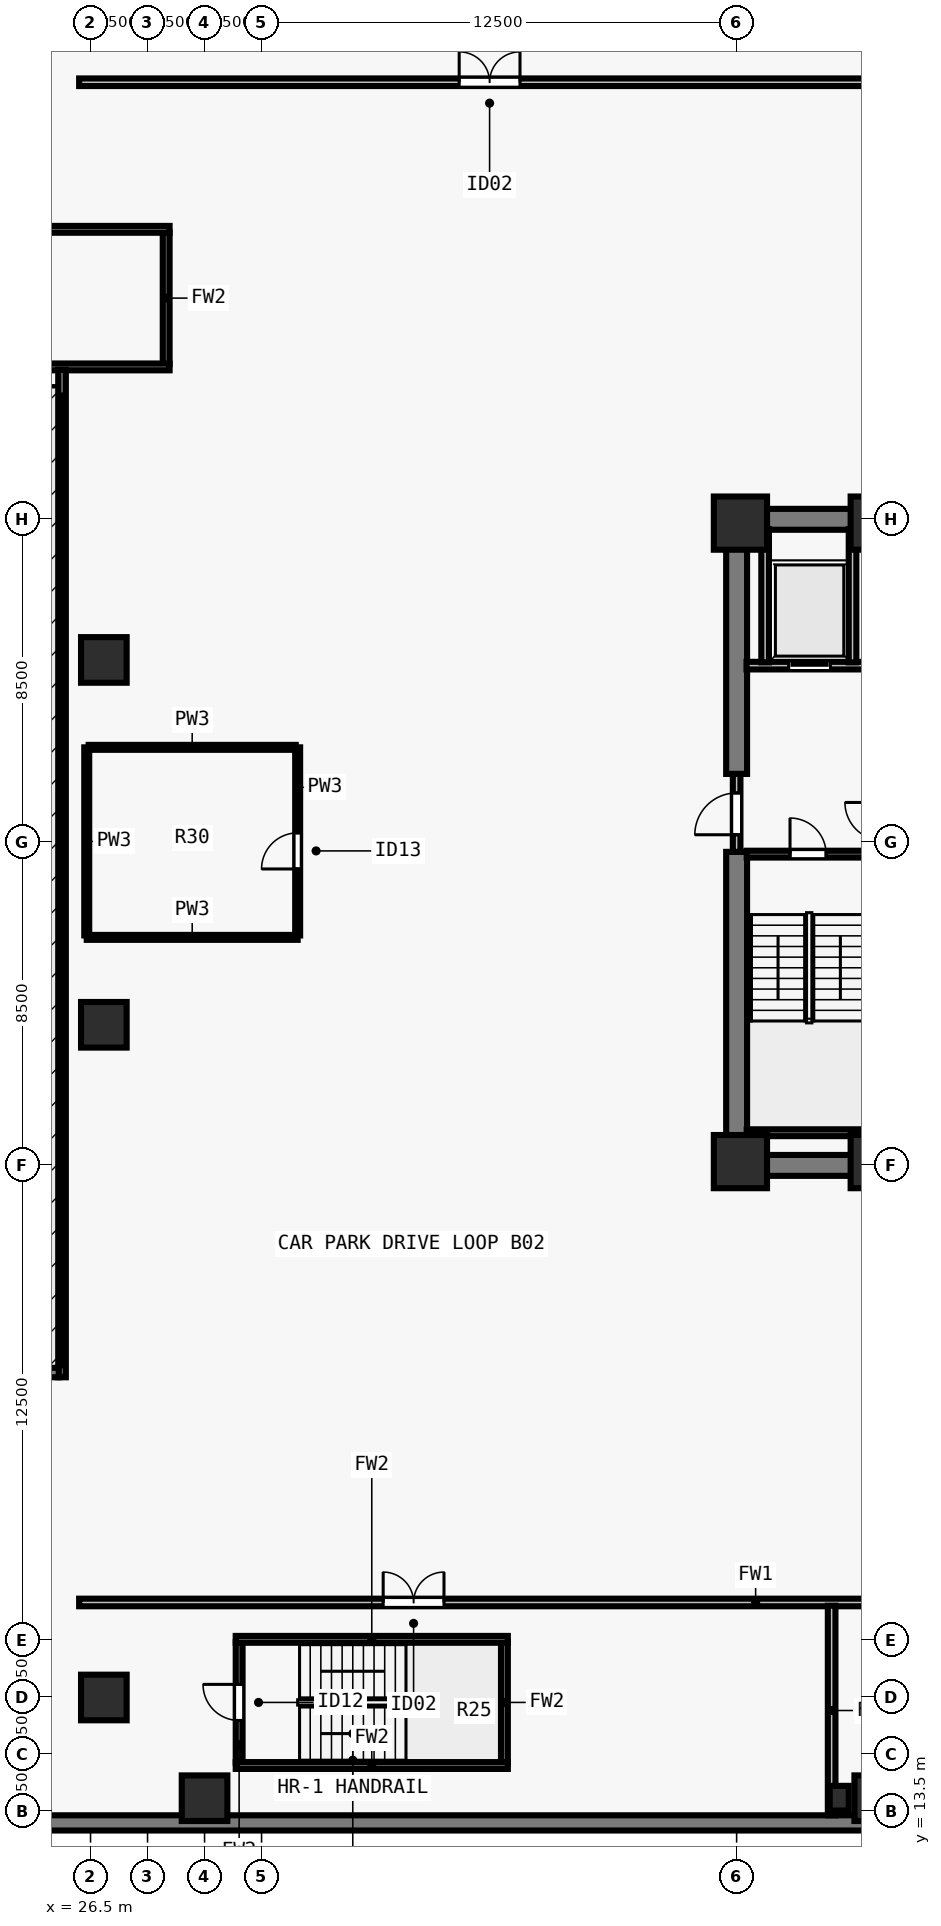
"""IFC4 building model, lengths in metres.
Left out: names, types, materials, properties, quantities, classifications, styles, units other than length and angle.
Written with IfcOpenShell. Run it as: python <this file> out.ifc"""

import sys

from ifc_helpers import new_model, si_unit, direction, frame, frame_2d, origin, origin_2d, place, context, subcontext, project, spatial, rectangle, extrude, element, fill, save


model = new_model("IFC4")
c1 = context("Model", 3, precision=1e-05, world=origin(), true_north=direction((0.0, 1.0)))
c2 = subcontext(c1, "Body", "Model", "MODEL_VIEW")
j1 = project(units=[si_unit("LENGTHUNIT", "METRE"), si_unit("PLANEANGLEUNIT", "RADIAN")], contexts=[c1])
p1 = place(None, origin())
s1 = spatial("IfcSite", under=j1, at=p1, CompositionType="ELEMENT")
p2 = place(p1, origin())
s2 = spatial("IfcBuilding", under=s1, at=p2, CompositionType="ELEMENT")
p3 = place(p2, frame((0.0, 0.0, -8.0)))
s3 = spatial("IfcBuildingStorey", under=s2, at=p3, CompositionType="ELEMENT", Elevation=-8.0)
for number, where, z_axis, x_axis in (
    (1, (43.6, 30.6, 0.0), (0.0, 0.0, 1.0), (1.0, 0.0, 0.0)),
    (2, (47.2, 30.6, 0.0), (0.0, 0.0, 1.0), (1.0, 0.0, 0.0)),
    (3, (43.6, 47.4, 0.0), (0.0, 0.0, 1.0), (1.0, 0.0, 0.0)),
    (4, (47.2, 47.4, 0.0), (0.0, 0.0, 1.0), (1.0, 0.0, 0.0)),
):
    element("IfcColumn", number, at=place(p3, frame(where, z_axis=z_axis, x_axis=x_axis)), inside=s3, PredefinedType="COLUMN", context=c2, shape_type="SweptSolid", body=[
        extrude(rectangle(XDim=1.4, YDim=1.4, at=origin_2d()), origin(), (0.0, 0.0, 1.0), 4.0),
    ])
for number, where, z_axis, x_axis in (
    (5, (29.5, 13.85, 0.0), (0.0, 0.0, 1.0), (1.0, 0.0, 0.0)),
    (6, (47.2, 13.85, 0.0), (0.0, 0.0, 1.0), (1.0, 0.0, 0.0)),
    (7, (26.85, 43.8, 0.0), (0.0, 0.0, 1.0), (1.0, 0.0, 0.0)),
    (8, (26.85, 34.2, 0.0), (0.0, 0.0, 1.0), (1.0, 0.0, 0.0)),
    (9, (26.85, 16.5, 0.0), (0.0, 0.0, 1.0), (1.0, 0.0, 0.0)),
):
    element("IfcColumn", number, at=place(p3, frame(where, z_axis=z_axis, x_axis=x_axis)), inside=s3, PredefinedType="COLUMN", context=c2, shape_type="SweptSolid", body=[
        extrude(rectangle(XDim=1.2, YDim=1.2, at=origin_2d()), origin(), (0.0, 0.0, 1.0), 4.0),
    ])
p4 = place(p3, frame((46.2, 13.85, 0.0), z_axis=(0.0, 0.0, 1.0), x_axis=(1.0, 0.0, 0.0)))
e10 = element("IfcColumn", 10, at=p4, inside=s3, PredefinedType="PILASTER", context=c2, shape_type="SweptSolid", body=[
    extrude(rectangle(XDim=0.5, YDim=0.65, at=origin_2d()), origin(), (0.0, 0.0, 1.0), 4.0),
])
p5 = place(p3, frame((85.0, 13.2, 0.0), z_axis=(0.0, 0.0, 1.0), x_axis=(-1.0, 0.0, 0.0)))
e11 = element("IfcWall", 11, at=p5, inside=s3, PredefinedType="USERDEFINED", context=c2, shape_type="SweptSolid", body=[
    extrude(rectangle(XDim=66.0, YDim=0.4, at=frame_2d((33.0, 0.0))), origin(), (0.0, 0.0, 1.0), 3.72),
])
for number, where, z_axis, x_axis in (
    (12, (43.225, 30.5, 0.0), (0.0, 0.0, 1.0), (1.0, 0.0, 0.0)),
    (13, (43.225, 47.5, 0.0), (0.0, 0.0, 1.0), (1.0, 0.0, 0.0)),
):
    element("IfcWall", number, at=place(p3, frame(where, z_axis=z_axis, x_axis=x_axis)), inside=s3, PredefinedType="SHEAR", context=c2, shape_type="SweptSolid", body=[
        extrude(rectangle(XDim=17.55, YDim=0.55, at=frame_2d((8.775, 0.0))), origin(), (0.0, 0.0, 1.0), 3.72),
    ])
p6 = place(p3, frame((43.5, 30.765, 0.0), z_axis=(0.0, 0.0, 1.0), x_axis=(0.0, 1.0, 0.0)))
e14 = element("IfcWall", 14, at=p6, inside=s3, PredefinedType="SHEAR", context=c2, shape_type="SweptSolid", body=[
    extrude(rectangle(XDim=7.985, YDim=0.55, at=frame_2d((3.993, 0.0))), origin(), (0.0, 0.0, 1.0), 3.72),
])
p7 = place(p3, frame((43.5, 40.8, 0.0), z_axis=(0.0, 0.0, 1.0), x_axis=(0.0, 1.0, 0.0)))
e15 = element("IfcWall", 15, at=p7, inside=s3, PredefinedType="SHEAR", context=c2, shape_type="SweptSolid", body=[
    extrude(rectangle(XDim=6.435, YDim=0.55, at=frame_2d((3.218, 0.0))), origin(), (0.0, 0.0, 1.0), 3.72),
])
p8 = place(p3, frame((43.5, 38.75, 0.0), z_axis=(0.0, 0.0, 1.0), x_axis=(0.0, 1.0, 0.0)))
e16 = element("IfcWall", 16, at=p8, inside=s3, PredefinedType="SOLIDWALL", context=c2, shape_type="SweptSolid", body=[
    extrude(rectangle(XDim=2.05, YDim=0.2, at=frame_2d((1.025, 0.0))), origin(), (0.0, 0.0, 1.0), 3.72),
])
p9 = place(p8, frame((0.45, 0.0, 0.0)))
e17 = element("IfcOpeningElement", 17, at=p9, cuts=e16, PredefinedType="OPENING", context=c2, shape_type="SweptSolid", body=[
    extrude(rectangle(XDim=1.1, YDim=2.15, at=frame_2d((0.55, 1.075))), frame((0.0, 0.11, 0.0), z_axis=(0.0, -1.0, 0.0), x_axis=(1.0, 0.0, 0.0)), (0.0, 0.0, 1.0), 0.22),
])
p10 = place(p3, frame((43.76, 43.65, 0.0), z_axis=(0.0, 0.0, 1.0), x_axis=(1.0, 0.0, 0.0)))
e18 = element("IfcWall", 18, at=p10, inside=s3, PredefinedType="SOLIDWALL", context=c2, shape_type="SweptSolid", body=[
    extrude(rectangle(XDim=3.505, YDim=0.2, at=frame_2d((1.752, 0.0))), origin(), (0.0, 0.0, 1.0), 3.72),
])
p11 = place(p10, frame((1.11, 0.0, 0.0)))
e19 = element("IfcOpeningElement", 19, at=p11, cuts=e18, PredefinedType="OPENING", context=c2, shape_type="SweptSolid", body=[
    extrude(rectangle(XDim=1.1, YDim=2.2, at=frame_2d((0.55, 1.1))), frame((0.0, 0.11, 0.0), z_axis=(0.0, -1.0, 0.0), x_axis=(1.0, 0.0, 0.0)), (0.0, 0.0, 1.0), 0.22),
])
for number, where, z_axis, x_axis in (
    (20, (46.55, 43.735, 0.0), (0.0, 0.0, 1.0), (0.0, 1.0, 0.0)),
    (21, (44.25, 43.735, 0.0), (0.0, 0.0, 1.0), (0.0, 1.0, 0.0)),
):
    element("IfcWall", number, at=place(p3, frame(where, z_axis=z_axis, x_axis=x_axis)), inside=s3, PredefinedType="SOLIDWALL", context=c2, shape_type="SweptSolid", body=[
        extrude(rectangle(XDim=3.505, YDim=0.2, at=frame_2d((1.752, 0.0))), origin(), (0.0, 0.0, 1.0), 3.72),
    ])
p12 = place(p3, frame((26.2, 19.0, 0.0), z_axis=(0.0, 0.0, 1.0), x_axis=(1.0, 0.0, 0.0)))
e22 = element("IfcWall", 22, at=p12, inside=s3, PredefinedType="SOLIDWALL", context=c2, shape_type="SweptSolid", body=[
    extrude(rectangle(XDim=51.6, YDim=0.2, at=frame_2d((25.8, 0.0))), origin(), (0.0, 0.0, 1.0), 3.238),
])
p13 = place(p12, frame((8.0, 0.0, 0.0)))
e23 = element("IfcOpeningElement", 23, at=p13, cuts=e22, PredefinedType="OPENING", context=c2, shape_type="SweptSolid", body=[
    extrude(rectangle(XDim=1.6, YDim=2.2, at=frame_2d((0.8, 1.1))), frame((0.0, 0.11, 0.0), z_axis=(0.0, -1.0, 0.0), x_axis=(1.0, 0.0, 0.0)), (0.0, 0.0, 1.0), 0.22),
])
p14 = place(p12, frame((26.0, 0.0, 0.0)))
e24 = element("IfcOpeningElement", 24, at=p14, cuts=e22, PredefinedType="OPENING", context=c2, shape_type="SweptSolid", body=[
    extrude(rectangle(XDim=1.6, YDim=2.2, at=frame_2d((0.8, 1.1))), frame((0.0, 0.11, 0.0), z_axis=(0.0, -1.0, 0.0), x_axis=(1.0, 0.0, 0.0)), (0.0, 0.0, 1.0), 0.22),
])
p15 = place(p12, frame((42.0, 0.0, 0.0)))
e25 = element("IfcOpeningElement", 25, at=p15, cuts=e22, PredefinedType="OPENING", context=c2, shape_type="SweptSolid", body=[
    extrude(rectangle(XDim=1.6, YDim=2.2, at=frame_2d((0.8, 1.1))), frame((0.0, 0.11, 0.0), z_axis=(0.0, -1.0, 0.0), x_axis=(1.0, 0.0, 0.0)), (0.0, 0.0, 1.0), 0.22),
])
p16 = place(p3, frame((26.2, 59.0, 0.0), z_axis=(0.0, 0.0, 1.0), x_axis=(1.0, 0.0, 0.0)))
e26 = element("IfcWall", 26, at=p16, inside=s3, PredefinedType="SOLIDWALL", context=c2, shape_type="SweptSolid", body=[
    extrude(rectangle(XDim=51.6, YDim=0.2, at=frame_2d((25.8, 0.0))), origin(), (0.0, 0.0, 1.0), 3.238),
])
p17 = place(p16, frame((10.0, 0.0, 0.0)))
e27 = element("IfcOpeningElement", 27, at=p17, cuts=e26, PredefinedType="OPENING", context=c2, shape_type="SweptSolid", body=[
    extrude(rectangle(XDim=1.6, YDim=2.2, at=frame_2d((0.8, 1.1))), frame((0.0, 0.11, 0.0), z_axis=(0.0, -1.0, 0.0), x_axis=(1.0, 0.0, 0.0)), (0.0, 0.0, 1.0), 0.22),
])
p18 = place(p16, frame((36.0, 0.0, 0.0)))
e28 = element("IfcOpeningElement", 28, at=p18, cuts=e26, PredefinedType="OPENING", context=c2, shape_type="SweptSolid", body=[
    extrude(rectangle(XDim=1.6, YDim=2.2, at=frame_2d((0.8, 1.1))), frame((0.0, 0.11, 0.0), z_axis=(0.0, -1.0, 0.0), x_axis=(1.0, 0.0, 0.0)), (0.0, 0.0, 1.0), 0.22),
])
p19 = place(p3, frame((46.0, 13.4, 0.0), z_axis=(0.0, 0.0, 1.0), x_axis=(0.0, 1.0, 0.0)))
e29 = element("IfcWall", 29, at=p19, inside=s3, PredefinedType="SOLIDWALL", context=c2, shape_type="SweptSolid", body=[
    extrude(rectangle(XDim=5.515, YDim=0.2, at=frame_2d((2.758, 0.0))), origin(), (0.0, 0.0, 1.0), 3.72),
])
p20 = place(p3, frame((26.4, 36.5, 0.0), z_axis=(0.0, 0.0, 1.0), x_axis=(1.0, 0.0, 0.0)))
e30 = element("IfcWall", 30, at=p20, inside=s3, PredefinedType="PLUMBINGWALL", context=c2, shape_type="SweptSolid", body=[
    extrude(rectangle(XDim=5.55, YDim=0.13, at=frame_2d((2.775, 0.0))), origin(), (0.0, 0.0, 1.0), 3.72),
])
p21 = place(p3, frame((26.4, 36.55, 0.0), z_axis=(0.0, 0.0, 1.0), x_axis=(0.0, 1.0, 0.0)))
e31 = element("IfcWall", 31, at=p21, inside=s3, PredefinedType="PLUMBINGWALL", context=c2, shape_type="SweptSolid", body=[
    extrude(rectangle(XDim=4.95, YDim=0.13, at=frame_2d((2.475, 0.0))), origin(), (0.0, 0.0, 1.0), 3.72),
])
p22 = place(p3, frame((31.95, 36.55, 0.0), z_axis=(0.0, 0.0, 1.0), x_axis=(0.0, 1.0, 0.0)))
e32 = element("IfcWall", 32, at=p22, inside=s3, PredefinedType="PLUMBINGWALL", context=c2, shape_type="SweptSolid", body=[
    extrude(rectangle(XDim=4.95, YDim=0.13, at=frame_2d((2.475, 0.0))), origin(), (0.0, 0.0, 1.0), 3.72),
])
p23 = place(p22, frame((1.75, 0.0, 0.0)))
e33 = element("IfcOpeningElement", 33, at=p23, cuts=e32, PredefinedType="OPENING", context=c2, shape_type="SweptSolid", body=[
    extrude(rectangle(XDim=0.95, YDim=2.1, at=frame_2d((0.475, 1.05))), frame((0.0, 0.075, 0.0), z_axis=(0.0, -1.0, 0.0), x_axis=(1.0, 0.0, 0.0)), (0.0, 0.0, 1.0), 0.15),
])
p24 = place(p3, frame((26.45, 41.5, 0.0), z_axis=(0.0, 0.0, 1.0), x_axis=(1.0, 0.0, 0.0)))
e34 = element("IfcWall", 34, at=p24, inside=s3, PredefinedType="PLUMBINGWALL", context=c2, shape_type="SweptSolid", body=[
    extrude(rectangle(XDim=5.45, YDim=0.13, at=frame_2d((2.725, 0.0))), origin(), (0.0, 0.0, 1.0), 3.72),
])
p25 = place(p3, frame((28.49, 51.585, 0.0), z_axis=(0.0, 0.0, 1.0), x_axis=(0.0, 1.0, 0.0)))
e35 = element("IfcWall", 35, at=p25, inside=s3, PredefinedType="SOLIDWALL", context=c2, shape_type="SweptSolid", body=[
    extrude(rectangle(XDim=3.47, YDim=0.18, at=frame_2d((1.735, 0.0))), origin(), (0.0, 0.0, 1.0), 3.72),
])
for number, where, z_axis, x_axis in (
    (36, (21.12, 51.51, 0.0), (0.0, 0.0, 1.0), (1.0, 0.0, 0.0)),
    (37, (21.12, 55.13, 0.0), (0.0, 0.0, 1.0), (1.0, 0.0, 0.0)),
):
    element("IfcWall", number, at=place(p3, frame(where, z_axis=z_axis, x_axis=x_axis)), inside=s3, PredefinedType="SOLIDWALL", context=c2, shape_type="SweptSolid", body=[
        extrude(rectangle(XDim=7.46, YDim=0.18, at=frame_2d((3.73, 0.0))), origin(), (0.0, 0.0, 1.0), 3.72),
    ])
p26 = place(p3, frame((43.765, 38.69, 0.0), z_axis=(0.0, 0.0, 1.0), x_axis=(1.0, 0.0, 0.0)))
e38 = element("IfcWall", 38, at=p26, inside=s3, PredefinedType="SOLIDWALL", context=c2, shape_type="SweptSolid", body=[
    extrude(rectangle(XDim=3.23, YDim=0.18, at=frame_2d((1.615, 0.0))), origin(), (0.0, 0.0, 1.0), 3.72),
])
p27 = place(p26, frame((1.14, 0.0, 0.0)))
e39 = element("IfcOpeningElement", 39, at=p27, cuts=e38, PredefinedType="OPENING", context=c2, shape_type="SweptSolid", body=[
    extrude(rectangle(XDim=0.95, YDim=2.15, at=frame_2d((0.475, 1.075))), frame((0.0, 0.1, 0.0), z_axis=(0.0, -1.0, 0.0), x_axis=(1.0, 0.0, 0.0)), (0.0, 0.0, 1.0), 0.2),
])
p28 = place(p3, frame((43.765, 31.36, 0.0), z_axis=(0.0, 0.0, 1.0), x_axis=(1.0, 0.0, 0.0)))
e40 = element("IfcWall", 40, at=p28, inside=s3, PredefinedType="SOLIDWALL", context=c2, shape_type="SweptSolid", body=[
    extrude(rectangle(XDim=3.23, YDim=0.18, at=frame_2d((1.615, 0.0))), origin(), (0.0, 0.0, 1.0), 3.72),
])
p29 = place(p3, frame((30.41, 14.785, 0.0), z_axis=(0.0, 0.0, 1.0), x_axis=(0.0, 1.0, 0.0)))
e41 = element("IfcWall", 41, at=p29, inside=s3, PredefinedType="SOLIDWALL", context=c2, shape_type="SweptSolid", body=[
    extrude(rectangle(XDim=3.17, YDim=0.18, at=frame_2d((1.585, 0.0))), origin(), (0.0, 0.0, 1.0), 3.72),
])
p30 = place(p29, frame((1.11, 0.0, 0.0)))
e42 = element("IfcOpeningElement", 42, at=p30, cuts=e41, PredefinedType="OPENING", context=c2, shape_type="SweptSolid", body=[
    extrude(rectangle(XDim=0.95, YDim=2.15, at=frame_2d((0.475, 1.075))), frame((0.0, 0.1, 0.0), z_axis=(0.0, -1.0, 0.0), x_axis=(1.0, 0.0, 0.0)), (0.0, 0.0, 1.0), 0.2),
])
p31 = place(p3, frame((37.39, 14.785, 0.0), z_axis=(0.0, 0.0, 1.0), x_axis=(0.0, 1.0, 0.0)))
e43 = element("IfcWall", 43, at=p31, inside=s3, PredefinedType="SOLIDWALL", context=c2, shape_type="SweptSolid", body=[
    extrude(rectangle(XDim=3.17, YDim=0.18, at=frame_2d((1.585, 0.0))), origin(), (0.0, 0.0, 1.0), 3.72),
])
for number, where, z_axis, x_axis in (
    (44, (30.32, 14.71, 0.0), (0.0, 0.0, 1.0), (1.0, 0.0, 0.0)),
    (45, (30.32, 18.03, 0.0), (0.0, 0.0, 1.0), (1.0, 0.0, 0.0)),
):
    element("IfcWall", number, at=place(p3, frame(where, z_axis=z_axis, x_axis=x_axis)), inside=s3, PredefinedType="SOLIDWALL", context=c2, shape_type="SweptSolid", body=[
        extrude(rectangle(XDim=7.16, YDim=0.18, at=frame_2d((3.58, 0.0))), origin(), (0.0, 0.0, 1.0), 3.72),
    ])
p32 = place(p3, frame((25.75, 24.925, 0.0), z_axis=(0.0, 0.0, 1.0), x_axis=(0.0, 1.0, 0.0)))
e46 = element("IfcWall", 46, at=p32, inside=s3, PredefinedType="SOLIDWALL", context=c2, shape_type="SweptSolid", body=[
    extrude(rectangle(XDim=26.51, YDim=0.2, at=frame_2d((13.255, 0.0))), origin(), (0.0, 0.0, 1.0), 3.72),
])
p33 = place(p3, frame((19.735, 25.05, 0.0), z_axis=(0.0, 0.0, 1.0), x_axis=(1.0, 0.0, 0.0)))
e47 = element("IfcWall", 47, at=p33, inside=s3, PredefinedType="SOLIDWALL", context=c2, shape_type="SweptSolid", body=[
    extrude(rectangle(XDim=5.93, YDim=0.25, at=frame_2d((2.965, 0.0))), origin(), (0.0, 0.0, 1.0), 3.72),
])
p34 = place(p9, origin())
e48 = element("IfcDoor", 48, at=p34, inside=s3, OperationType="SINGLE_SWING_LEFT", PredefinedType="DOOR", context=c2, shape_type="SweptSolid", body=[
    extrude(rectangle(XDim=1.1, YDim=2.15, at=frame_2d((0.55, 1.075))), frame((0.0, 0.025, 0.0), z_axis=(0.0, -1.0, 0.0), x_axis=(1.0, 0.0, 0.0)), (0.0, 0.0, 1.0), 0.05),
])
fill(e17, e48)
p35 = place(p11, origin())
e49 = element("IfcDoor", 49, at=p35, inside=s3, OperationType="SLIDING_TO_LEFT", PredefinedType="DOOR", context=c2, shape_type="SweptSolid", body=[
    extrude(rectangle(XDim=1.1, YDim=2.2, at=frame_2d((0.55, 1.1))), frame((0.0, 0.025, 0.0), z_axis=(0.0, -1.0, 0.0), x_axis=(1.0, 0.0, 0.0)), (0.0, 0.0, 1.0), 0.05),
])
fill(e19, e49)
p36 = place(p13, origin())
e50 = element("IfcDoor", 50, at=p36, inside=s3, OperationType="DOUBLE_DOOR_SINGLE_SWING", PredefinedType="DOOR", context=c2, shape_type="SweptSolid", body=[
    extrude(rectangle(XDim=1.6, YDim=2.2, at=frame_2d((0.8, 1.1))), frame((0.0, 0.025, 0.0), z_axis=(0.0, -1.0, 0.0), x_axis=(1.0, 0.0, 0.0)), (0.0, 0.0, 1.0), 0.05),
])
fill(e23, e50)
p37 = place(p17, origin())
e51 = element("IfcDoor", 51, at=p37, inside=s3, OperationType="DOUBLE_DOOR_SINGLE_SWING", PredefinedType="DOOR", context=c2, shape_type="SweptSolid", body=[
    extrude(rectangle(XDim=1.6, YDim=2.2, at=frame_2d((0.8, 1.1))), frame((0.0, 0.025, 0.0), z_axis=(0.0, -1.0, 0.0), x_axis=(1.0, 0.0, 0.0)), (0.0, 0.0, 1.0), 0.05),
])
fill(e27, e51)
p38 = place(p23, origin())
e52 = element("IfcDoor", 52, at=p38, inside=s3, OperationType="SINGLE_SWING_LEFT", PredefinedType="DOOR", context=c2, shape_type="SweptSolid", body=[
    extrude(rectangle(XDim=0.95, YDim=2.1, at=frame_2d((0.475, 1.05))), frame((0.0, 0.025, 0.0), z_axis=(0.0, -1.0, 0.0), x_axis=(1.0, 0.0, 0.0)), (0.0, 0.0, 1.0), 0.05),
])
fill(e33, e52)
p39 = place(p27, origin())
e53 = element("IfcDoor", 53, at=p39, inside=s3, OperationType="SINGLE_SWING_LEFT", PredefinedType="DOOR", context=c2, shape_type="SweptSolid", body=[
    extrude(rectangle(XDim=0.95, YDim=2.15, at=frame_2d((0.475, 1.075))), frame((0.0, 0.025, 0.0), z_axis=(0.0, -1.0, 0.0), x_axis=(1.0, 0.0, 0.0)), (0.0, 0.0, 1.0), 0.05),
])
fill(e39, e53)
p40 = place(p30, origin())
e54 = element("IfcDoor", 54, at=p40, inside=s3, OperationType="SINGLE_SWING_RIGHT", PredefinedType="DOOR", context=c2, shape_type="SweptSolid", body=[
    extrude(rectangle(XDim=0.95, YDim=2.15, at=frame_2d((0.475, 1.075))), frame((0.0, 0.025, 0.0), z_axis=(0.0, -1.0, 0.0), x_axis=(1.0, 0.0, 0.0)), (0.0, 0.0, 1.0), 0.05),
])
fill(e42, e54)
save(model, sys.argv[1])
